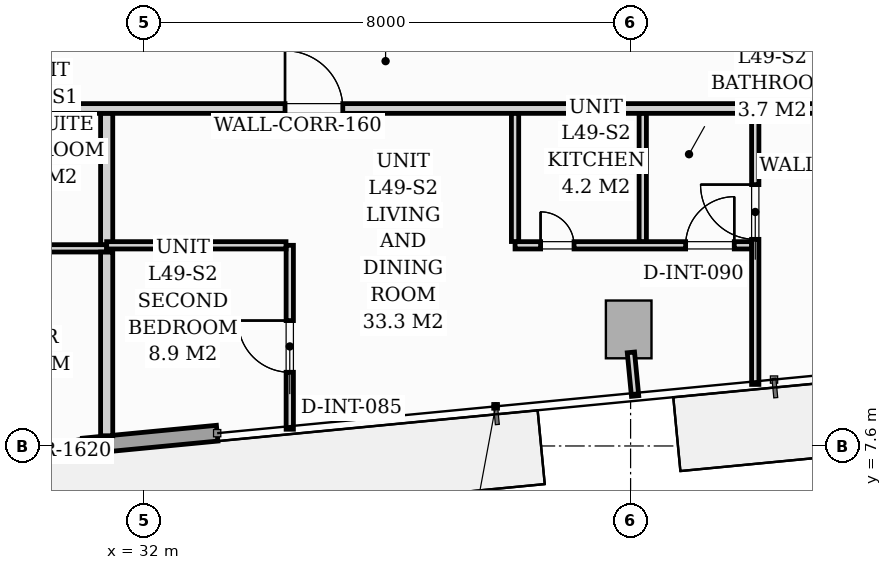
"""IFC4 building model, lengths in metres.
Left out: names, types, materials, properties, quantities, classifications, styles, units other than length and angle.
Written with IfcOpenShell. Run it as: python <this file> out.ifc"""

import sys

from ifc_helpers import new_model, si_unit, direction, frame, frame_2d, origin, origin_2d, place, context, subcontext, project, spatial, rectangle, extrude, source, transform, mapped, element, fill, save


model = new_model("IFC4")
c1 = context("Model", 3, precision=1e-05, world=origin(), true_north=direction((0.0, 1.0)))
c2 = subcontext(c1, "Body", "Model", "MODEL_VIEW")
j1 = project(units=[si_unit("LENGTHUNIT", "METRE"), si_unit("PLANEANGLEUNIT", "RADIAN")], contexts=[c1])
p1 = place(None, origin())
s1 = spatial("IfcSite", under=j1, at=p1, CompositionType="ELEMENT")
p2 = place(p1, origin())
s2 = spatial("IfcBuilding", under=s1, at=p2, CompositionType="ELEMENT")
p3 = place(p2, frame((0.0, 0.0, 173.0)))
s3 = spatial("IfcBuildingStorey", under=s2, at=p3, CompositionType="ELEMENT", Elevation=173.0)
m1 = source(origin(), c2, "Body", "SweptSolid", [
    extrude(rectangle(XDim=0.75, YDim=0.95, at=origin_2d()), origin(), (0.0, 0.0, 1.0), 3.196),
])
p4 = place(p3, frame((39.969, 9.517, 0.002), z_axis=(0.0, 0.0, 1.0), x_axis=(0.995396198367, 0.09584575252, 0.0)))
e1 = element("IfcColumn", 1, at=p4, inside=s3, PredefinedType="COLUMN", context=c2, shape_type="MappedRepresentation", body=[
    mapped(m1, transform((0.0, 0.0, 0.0), scale=1.0)),
])
p5 = place(p3, frame((33.201, 7.81, 0.0), z_axis=(0.0, 0.0, 1.0), x_axis=(-0.995397074604, -0.095836652014, 0.0)))
e2 = element("IfcWall", 2, at=p5, inside=s3, PredefinedType="STANDARD", context=c2, shape_type="SweptSolid", body=[
    extrude(rectangle(XDim=16.1, YDim=0.26, at=frame_2d((8.05, 0.0))), origin(), (0.0, 0.0, 1.0), 2.94),
])
p6 = place(p5, frame((6.23, 0.0, 0.0)))
e3 = element("IfcOpeningElement", 3, at=p6, cuts=e2, PredefinedType="OPENING", context=c2, shape_type="SweptSolid", body=[
    extrude(rectangle(XDim=1.8, YDim=2.06, at=frame_2d((0.9, 1.03))), frame((0.0, 0.14, 0.0), z_axis=(0.0, -1.0, 0.0), x_axis=(1.0, 0.0, 0.0)), (0.0, 0.0, 1.0), 0.28),
])
p7 = place(p5, frame((11.05, 0.0, 0.65)))
e4 = element("IfcOpeningElement", 4, at=p7, cuts=e2, PredefinedType="OPENING", context=c2, shape_type="SweptSolid", body=[
    extrude(rectangle(XDim=1.6, YDim=1.5, at=frame_2d((0.8, 0.75))), frame((0.0, 0.14, 0.0), z_axis=(0.0, -1.0, 0.0), x_axis=(1.0, 0.0, 0.0)), (0.0, 0.0, 1.0), 0.28),
])
p8 = place(p5, frame((2.213, 0.0, 0.75)))
e5 = element("IfcOpeningElement", 5, at=p8, cuts=e2, PredefinedType="OPENING", context=c2, shape_type="SweptSolid", body=[
    extrude(rectangle(XDim=1.6, YDim=1.5, at=frame_2d((0.8, 0.75))), frame((0.0, 0.14, 0.0), z_axis=(0.0, -1.0, 0.0), x_axis=(1.0, 0.0, 0.0)), (0.0, 0.0, 1.0), 0.28),
])
p9 = place(p3, frame((22.6, 13.15, 0.0), z_axis=(0.0, 0.0, 1.0), x_axis=(1.0, 0.0, 0.0)))
e6 = element("IfcWall", 6, at=p9, inside=s3, PredefinedType="PARTITIONING", context=c2, shape_type="SweptSolid", body=[
    extrude(rectangle(XDim=23.28, YDim=0.16, at=frame_2d((11.64, 0.0))), origin(), (0.0, 0.0, 1.0), 2.94),
])
p10 = place(p9, frame((0.607, 0.0, 0.0)))
e7 = element("IfcOpeningElement", 7, at=p10, cuts=e6, PredefinedType="OPENING", context=c2, shape_type="SweptSolid", body=[
    extrude(rectangle(XDim=0.95, YDim=2.06, at=frame_2d((0.475, 1.03))), frame((0.0, 0.09, 0.0), z_axis=(0.0, -1.0, 0.0), x_axis=(1.0, 0.0, 0.0)), (0.0, 0.0, 1.0), 0.18),
])
p11 = place(p9, frame((11.717, 0.0, 0.0)))
e8 = element("IfcOpeningElement", 8, at=p11, cuts=e6, PredefinedType="OPENING", context=c2, shape_type="SweptSolid", body=[
    extrude(rectangle(XDim=0.95, YDim=2.06, at=frame_2d((0.475, 1.03))), frame((0.0, 0.09, 0.0), z_axis=(0.0, -1.0, 0.0), x_axis=(1.0, 0.0, 0.0)), (0.0, 0.0, 1.0), 0.18),
])
p12 = place(p3, frame((28.696, 10.85, 0.0), z_axis=(0.0, 0.0, 1.0), x_axis=(1.0, 0.0, 0.0)))
e9 = element("IfcWall", 9, at=p12, inside=s3, PredefinedType="PARTITIONING", context=c2, shape_type="SweptSolid", body=[
    extrude(rectangle(XDim=2.688, YDim=0.12, at=frame_2d((1.344, 0.0))), origin(), (0.0, 0.0, 1.0), 2.94),
])
p13 = place(p12, frame((0.863, 0.0, 0.0)))
e10 = element("IfcOpeningElement", 10, at=p13, cuts=e9, PredefinedType="OPENING", context=c2, shape_type="SweptSolid", body=[
    extrude(rectangle(XDim=0.8, YDim=2.02, at=frame_2d((0.4, 1.01))), frame((0.0, 0.07, 0.0), z_axis=(0.0, -1.0, 0.0), x_axis=(1.0, 0.0, 0.0)), (0.0, 0.0, 1.0), 0.14),
])
p14 = place(p3, frame((31.384, 7.768, 0.0), z_axis=(0.0, 0.0, 1.0), x_axis=(0.0, 1.0, 0.0)))
e11 = element("IfcWall", 11, at=p14, inside=s3, PredefinedType="PARTITIONING", context=c2, shape_type="SweptSolid", body=[
    extrude(rectangle(XDim=3.02, YDim=0.2, at=frame_2d((1.51, 0.0))), origin(), (0.0, 0.0, 1.0), 2.94),
])
p15 = place(p3, frame((31.384, 10.912, 0.0), z_axis=(0.0, 0.0, 1.0), x_axis=(0.0, 1.0, 0.0)))
e12 = element("IfcWall", 12, at=p15, inside=s3, PredefinedType="PARTITIONING", context=c2, shape_type="SweptSolid", body=[
    extrude(rectangle(XDim=2.156, YDim=0.2, at=frame_2d((1.078, 0.0))), origin(), (0.0, 0.0, 1.0), 2.94),
])
p16 = place(p3, frame((42.05, 8.612, 0.0), z_axis=(0.0, 0.0, 1.0), x_axis=(0.0, 1.0, 0.0)))
e13 = element("IfcWall", 13, at=p16, inside=s3, PredefinedType="PARTITIONING", context=c2, shape_type="SweptSolid", body=[
    extrude(rectangle(XDim=4.456, YDim=0.12, at=frame_2d((2.228, 0.0))), origin(), (0.0, 0.0, 1.0), 2.94),
])
p17 = place(p16, frame((2.386, 0.0, 0.0)))
e14 = element("IfcOpeningElement", 14, at=p17, cuts=e13, PredefinedType="OPENING", context=c2, shape_type="SweptSolid", body=[
    extrude(rectangle(XDim=0.9, YDim=2.05, at=frame_2d((0.45, 1.025))), frame((0.0, 0.07, 0.0), z_axis=(0.0, -1.0, 0.0), x_axis=(1.0, 0.0, 0.0)), (0.0, 0.0, 1.0), 0.14),
])
p18 = place(p3, frame((38.1, 10.9, 0.0), z_axis=(0.0, 0.0, 1.0), x_axis=(1.0, 0.0, 0.0)))
e15 = element("IfcWall", 15, at=p18, inside=s3, PredefinedType="PARTITIONING", context=c2, shape_type="SweptSolid", body=[
    extrude(rectangle(XDim=3.888, YDim=0.12, at=frame_2d((1.944, 0.0))), origin(), (0.0, 0.0, 1.0), 2.94),
])
p19 = place(p18, frame((0.42, 0.0, 0.0)))
e16 = element("IfcOpeningElement", 16, at=p19, cuts=e15, PredefinedType="OPENING", context=c2, shape_type="SweptSolid", body=[
    extrude(rectangle(XDim=0.55, YDim=2.0, at=frame_2d((0.275, 1.0))), frame((0.0, 0.07, 0.0), z_axis=(0.0, -1.0, 0.0), x_axis=(1.0, 0.0, 0.0)), (0.0, 0.0, 1.0), 0.14),
])
p20 = place(p18, frame((2.805, 0.0, 0.0)))
e17 = element("IfcOpeningElement", 17, at=p20, cuts=e15, PredefinedType="OPENING", context=c2, shape_type="SweptSolid", body=[
    extrude(rectangle(XDim=0.8, YDim=2.02, at=frame_2d((0.4, 1.01))), frame((0.0, 0.07, 0.0), z_axis=(0.0, -1.0, 0.0), x_axis=(1.0, 0.0, 0.0)), (0.0, 0.0, 1.0), 0.14),
])
for number, where, z_axis, x_axis in (
    (18, (40.2, 10.962, 0.0), (0.0, 0.0, 1.0), (0.0, 1.0, 0.0)),
    (19, (38.1, 10.962, 0.0), (0.0, 0.0, 1.0), (0.0, 1.0, 0.0)),
):
    element("IfcWall", number, at=place(p3, frame(where, z_axis=z_axis, x_axis=x_axis)), inside=s3, PredefinedType="PARTITIONING", context=c2, shape_type="SweptSolid", body=[
        extrude(rectangle(XDim=2.106, YDim=0.12, at=frame_2d((1.053, 0.0))), origin(), (0.0, 0.0, 1.0), 2.94),
    ])
p21 = place(p3, frame((34.395, 7.875, 0.0), z_axis=(0.0, 0.0, 1.0), x_axis=(0.0, 1.0, 0.0)))
e20 = element("IfcWall", 20, at=p21, inside=s3, PredefinedType="PARTITIONING", context=c2, shape_type="SweptSolid", body=[
    extrude(rectangle(XDim=3.025, YDim=0.12, at=frame_2d((1.512, 0.0))), origin(), (0.0, 0.0, 1.0), 2.94),
])
p22 = place(p21, frame((0.937, 0.0, 0.0)))
e21 = element("IfcOpeningElement", 21, at=p22, cuts=e20, PredefinedType="OPENING", context=c2, shape_type="SweptSolid", body=[
    extrude(rectangle(XDim=0.85, YDim=2.05, at=frame_2d((0.425, 1.025))), frame((0.0, 0.07, 0.0), z_axis=(0.0, -1.0, 0.0), x_axis=(1.0, 0.0, 0.0)), (0.0, 0.0, 1.0), 0.14),
])
p23 = place(p3, frame((31.384, 10.9, 0.0), z_axis=(0.0, 0.0, 1.0), x_axis=(1.0, 0.0, 0.0)))
e22 = element("IfcWall", 22, at=p23, inside=s3, PredefinedType="PARTITIONING", context=c2, shape_type="SweptSolid", body=[
    extrude(rectangle(XDim=2.949, YDim=0.12, at=frame_2d((1.475, 0.0))), origin(), (0.0, 0.0, 1.0), 2.94),
])
p24 = place(p3, frame((40.005, 9.139, 0.0), z_axis=(0.0, 0.0, 1.0), x_axis=(0.095977354523, -0.995383517755, 0.0)))
e23 = element("IfcWall", 23, at=p24, inside=s3, PredefinedType="PARTITIONING", context=c2, shape_type="SweptSolid", body=[
    extrude(rectangle(XDim=0.72, YDim=0.12, at=frame_2d((0.36, 0.0))), origin(), (0.0, 0.0, 1.0), 2.94),
])
m2 = source(origin(), c2, "Body", "SweptSolid", [
    extrude(rectangle(XDim=1.6, YDim=1.5, at=frame_2d((0.8, 0.75))), frame((0.0, 0.03, 0.0), z_axis=(0.0, -1.0, 0.0), x_axis=(1.0, 0.0, 0.0)), (0.0, 0.0, 1.0), 0.06),
])
p25 = place(p8, origin())
e24 = element("IfcWindow", 24, at=p25, inside=s3, PartitioningType="SINGLE_PANEL", PredefinedType="WINDOW", context=c2, shape_type="MappedRepresentation", body=[
    mapped(m2, transform((0.0, 0.0, 0.0), scale=1.0)),
])
fill(e5, e24)
m3 = source(origin(), c2, "Body", "SweptSolid", [
    extrude(rectangle(XDim=0.85, YDim=2.05, at=frame_2d((0.425, 1.025))), frame((0.0, 0.025, 0.0), z_axis=(0.0, -1.0, 0.0), x_axis=(1.0, 0.0, 0.0)), (0.0, 0.0, 1.0), 0.05),
])
p26 = place(p22, origin())
e25 = element("IfcDoor", 25, at=p26, inside=s3, OperationType="SINGLE_SWING_RIGHT", PredefinedType="DOOR", context=c2, shape_type="MappedRepresentation", body=[
    mapped(m3, transform((0.0, 0.0, 0.0), scale=1.0)),
])
fill(e21, e25)
m4 = source(origin(), c2, "Body", "SweptSolid", [
    extrude(rectangle(XDim=0.95, YDim=2.06, at=frame_2d((0.475, 1.03))), frame((0.0, 0.025, 0.0), z_axis=(0.0, -1.0, 0.0), x_axis=(1.0, 0.0, 0.0)), (0.0, 0.0, 1.0), 0.05),
])
p27 = place(p11, origin())
e26 = element("IfcDoor", 26, at=p27, inside=s3, OperationType="SINGLE_SWING_LEFT", PredefinedType="DOOR", context=c2, shape_type="MappedRepresentation", body=[
    mapped(m4, transform((0.0, 0.0, 0.0), scale=1.0)),
])
fill(e8, e26)
m5 = source(origin(), c2, "Body", "SweptSolid", [
    extrude(rectangle(XDim=0.9, YDim=2.05, at=frame_2d((0.45, 1.025))), frame((0.0, 0.025, 0.0), z_axis=(0.0, -1.0, 0.0), x_axis=(1.0, 0.0, 0.0)), (0.0, 0.0, 1.0), 0.05),
])
p28 = place(p17, origin())
e27 = element("IfcDoor", 27, at=p28, inside=s3, OperationType="SINGLE_SWING_RIGHT", PredefinedType="DOOR", context=c2, shape_type="MappedRepresentation", body=[
    mapped(m5, transform((0.0, 0.0, 0.0), scale=1.0)),
])
fill(e14, e27)
m6 = source(origin(), c2, "Body", "SweptSolid", [
    extrude(rectangle(XDim=0.55, YDim=2.0, at=frame_2d((0.275, 1.0))), frame((0.0, 0.025, 0.0), z_axis=(0.0, -1.0, 0.0), x_axis=(1.0, 0.0, 0.0)), (0.0, 0.0, 1.0), 0.05),
])
p29 = place(p19, origin())
e28 = element("IfcDoor", 28, at=p29, inside=s3, OperationType="SINGLE_SWING_LEFT", PredefinedType="DOOR", context=c2, shape_type="MappedRepresentation", body=[
    mapped(m6, transform((0.0, 0.0, 0.0), scale=1.0)),
])
fill(e16, e28)
m7 = source(origin(), c2, "Body", "SweptSolid", [
    extrude(rectangle(XDim=0.8, YDim=2.02, at=frame_2d((0.4, 1.01))), frame((0.0, 0.025, 0.0), z_axis=(0.0, -1.0, 0.0), x_axis=(1.0, 0.0, 0.0)), (0.0, 0.0, 1.0), 0.05),
])
p30 = place(p20, origin())
e29 = element("IfcDoor", 29, at=p30, inside=s3, OperationType="SINGLE_SWING_RIGHT", PredefinedType="DOOR", context=c2, shape_type="MappedRepresentation", body=[
    mapped(m7, transform((0.0, 0.0, 0.0), scale=1.0)),
])
fill(e17, e29)
save(model, sys.argv[1])
